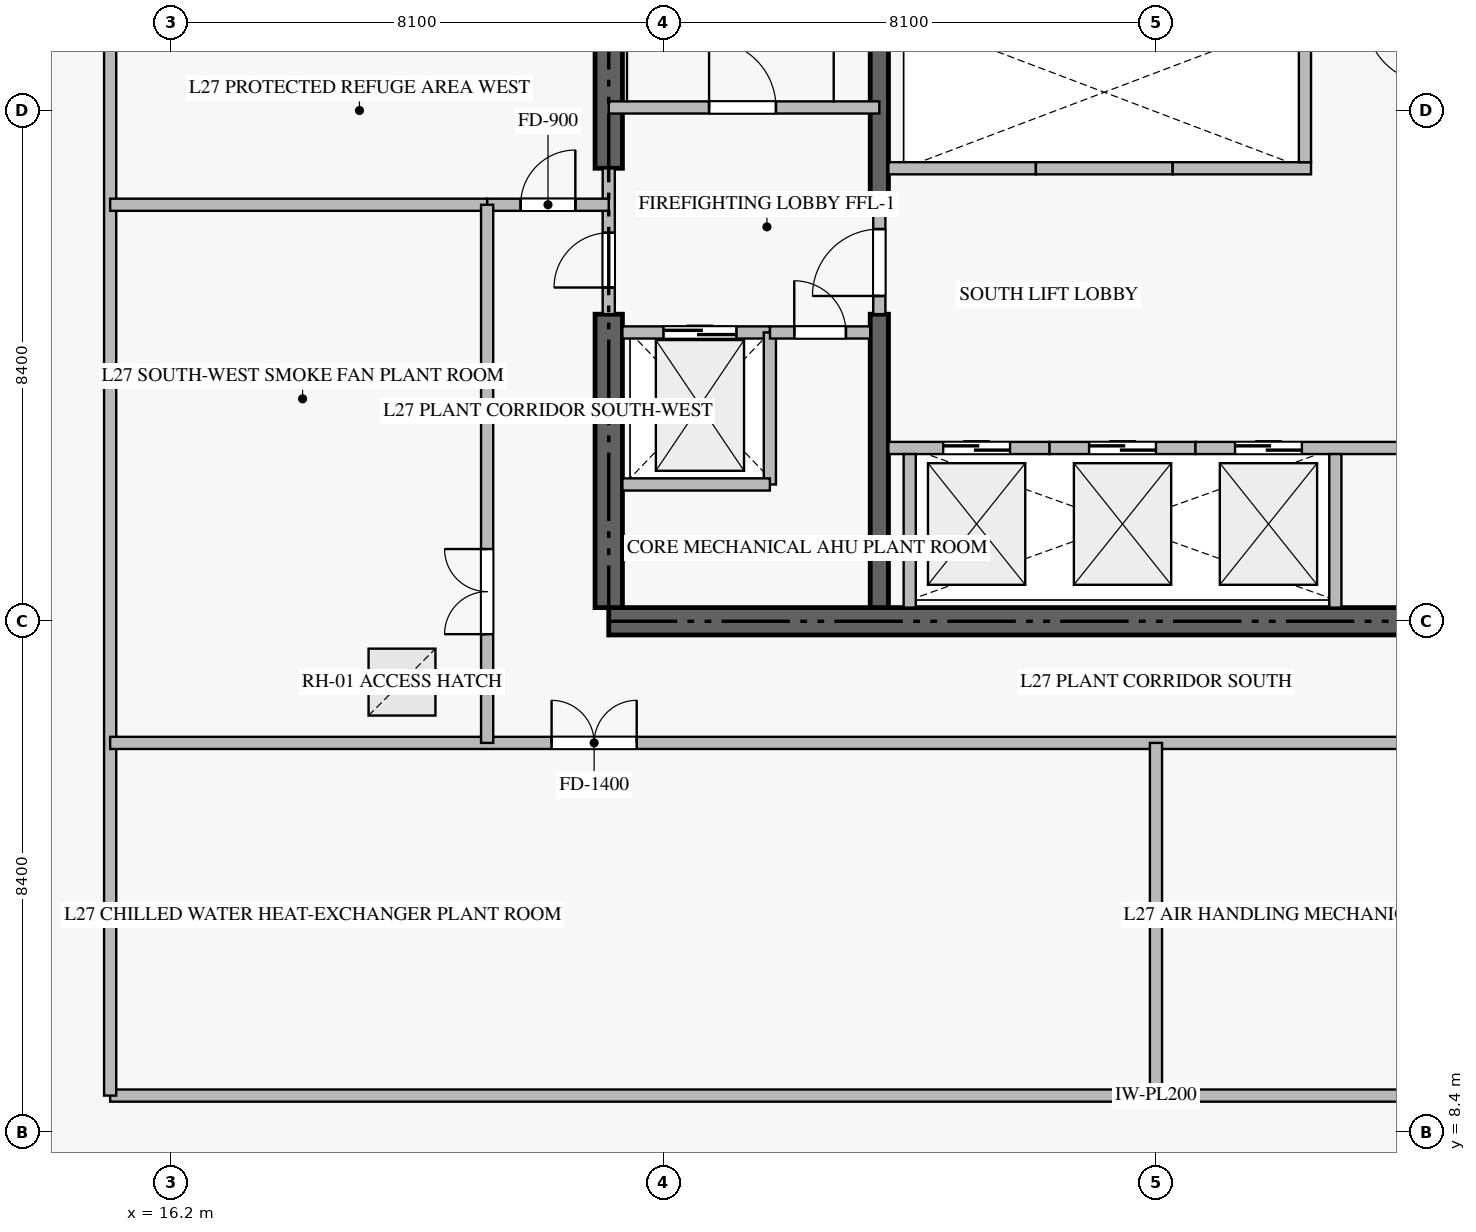
"""IFC4 building model, lengths in metres.
Left out: names, types, materials, properties, quantities, classifications, styles, units other than length and angle.
Written with IfcOpenShell. Run it as: python <this file> out.ifc"""

import sys

from ifc_helpers import new_model, si_unit, direction, frame, frame_2d, origin, origin_2d, place, context, subcontext, project, spatial, rectangle, extrude, source, transform, mapped, element, fill, save


model = new_model("IFC4")
c1 = context("Model", 3, precision=1e-05, world=origin(), true_north=direction((0.0, 1.0)))
c2 = subcontext(c1, "Body", "Model", "MODEL_VIEW")
j1 = project(units=[si_unit("LENGTHUNIT", "METRE"), si_unit("PLANEANGLEUNIT", "RADIAN")], contexts=[c1])
p1 = place(None, origin())
s1 = spatial("IfcSite", under=j1, at=p1, CompositionType="ELEMENT")
p2 = place(p1, origin())
s2 = spatial("IfcBuilding", under=s1, at=p2, CompositionType="ELEMENT")
p3 = place(p2, frame((0.0, 0.0, 109.2)))
s3 = spatial("IfcBuildingStorey", under=s2, at=p3, CompositionType="ELEMENT", Elevation=109.2)
p4 = place(p3, frame((23.4, 16.8, -0.36), z_axis=(0.0, 0.0, 1.0), x_axis=(1.0, 0.0, 0.0)))
e1 = element("IfcWall", 1, at=p4, inside=s3, PredefinedType="SHEAR", context=c2, shape_type="SweptSolid", body=[
    extrude(rectangle(XDim=18.0, YDim=0.45, at=frame_2d((9.0, 0.0))), origin(), (0.0, 0.0, 1.0), 5.998),
])
p5 = place(p3, frame((23.4, 17.025, -0.36), z_axis=(0.0, 0.0, 1.0), x_axis=(0.0, 1.0, 0.0)))
e2 = element("IfcWall", 2, at=p5, inside=s3, PredefinedType="SHEAR", context=c2, shape_type="SweptSolid", body=[
    extrude(rectangle(XDim=4.825, YDim=0.45, at=frame_2d((2.413, 0.0))), origin(), (0.0, 0.0, 1.0), 5.998),
])
p6 = place(p3, frame((23.4, 24.25, -0.36), z_axis=(0.0, 0.0, 1.0), x_axis=(0.0, 1.0, 0.0)))
e3 = element("IfcWall", 3, at=p6, inside=s3, PredefinedType="SHEAR", context=c2, shape_type="SweptSolid", body=[
    extrude(rectangle(XDim=9.125, YDim=0.45, at=frame_2d((4.562, 0.0))), origin(), (0.0, 0.0, 1.0), 5.998),
])
p7 = place(p3, frame((27.85, 17.025, -0.36), z_axis=(0.0, 0.0, 1.0), x_axis=(0.0, 1.0, 0.0)))
e4 = element("IfcWall", 4, at=p7, inside=s3, PredefinedType="SHEAR", context=c2, shape_type="SweptSolid", body=[
    extrude(rectangle(XDim=4.825, YDim=0.3, at=frame_2d((2.413, 0.0))), origin(), (0.0, 0.0, 1.0), 5.998),
])
p8 = place(p3, frame((27.85, 23.55, -0.36), z_axis=(0.0, 0.0, 1.0), x_axis=(0.0, 1.0, 0.0)))
e5 = element("IfcWall", 5, at=p8, inside=s3, PredefinedType="SHEAR", context=c2, shape_type="SweptSolid", body=[
    extrude(rectangle(XDim=9.825, YDim=0.3, at=frame_2d((4.913, 0.0))), origin(), (0.0, 0.0, 1.0), 5.998),
])
p9 = place(p3, frame((23.4, 25.25, 0.0), z_axis=(0.0, 0.0, 1.0), x_axis=(1.0, 0.0, 0.0)))
e6 = element("IfcWall", 6, at=p9, inside=s3, PredefinedType="STANDARD", context=c2, shape_type="SweptSolid", body=[
    extrude(rectangle(XDim=4.45, YDim=0.2, at=frame_2d((2.225, 0.0))), origin(), (0.0, 0.0, 1.0), 5.64),
])
p10 = place(p9, frame((1.65, 0.0, 0.0)))
e7 = element("IfcOpeningElement", 7, at=p10, cuts=e6, PredefinedType="OPENING", context=c2, shape_type="SweptSolid", body=[
    extrude(rectangle(XDim=1.1, YDim=2.15, at=frame_2d((0.55, 1.075))), frame((0.0, 0.11, 0.0), z_axis=(0.0, -1.0, 0.0), x_axis=(1.0, 0.0, 0.0)), (0.0, 0.0, 1.0), 0.22),
])
p11 = place(p3, frame((23.625, 21.55, 0.0), z_axis=(0.0, 0.0, 1.0), x_axis=(1.0, 0.0, 0.0)))
e8 = element("IfcWall", 8, at=p11, inside=s3, PredefinedType="STANDARD", context=c2, shape_type="SweptSolid", body=[
    extrude(rectangle(XDim=2.425, YDim=0.2, at=frame_2d((1.212, 0.0))), origin(), (0.0, 0.0, 1.0), 5.64),
])
p12 = place(p11, frame((0.675, 0.0, 0.0)))
e9 = element("IfcOpeningElement", 9, at=p12, cuts=e8, PredefinedType="OPENING", context=c2, shape_type="SweptSolid", body=[
    extrude(rectangle(XDim=1.2, YDim=2.2, at=frame_2d((0.6, 1.1))), frame((0.0, 0.11, 0.0), z_axis=(0.0, -1.0, 0.0), x_axis=(1.0, 0.0, 0.0)), (0.0, 0.0, 1.0), 0.22),
])
p13 = place(p3, frame((28.0, 19.65, 0.0), z_axis=(0.0, 0.0, 1.0), x_axis=(1.0, 0.0, 0.0)))
e10 = element("IfcWall", 10, at=p13, inside=s3, PredefinedType="STANDARD", context=c2, shape_type="SweptSolid", body=[
    extrude(rectangle(XDim=2.65, YDim=0.2, at=frame_2d((1.325, 0.0))), origin(), (0.0, 0.0, 1.0), 5.64),
])
p14 = place(p13, frame((0.9, 0.0, 0.0)))
e11 = element("IfcOpeningElement", 11, at=p14, cuts=e10, PredefinedType="OPENING", context=c2, shape_type="SweptSolid", body=[
    extrude(rectangle(XDim=1.1, YDim=2.2, at=frame_2d((0.55, 1.1))), frame((0.0, 0.11, 0.0), z_axis=(0.0, -1.0, 0.0), x_axis=(1.0, 0.0, 0.0)), (0.0, 0.0, 1.0), 0.22),
])
p15 = place(p3, frame((28.35, 17.025, 0.0), z_axis=(0.0, 0.0, 1.0), x_axis=(0.0, 1.0, 0.0)))
e12 = element("IfcWall", 12, at=p15, inside=s3, PredefinedType="STANDARD", context=c2, shape_type="SweptSolid", body=[
    extrude(rectangle(XDim=2.525, YDim=0.2, at=frame_2d((1.263, 0.0))), origin(), (0.0, 0.0, 1.0), 5.64),
])
p16 = place(p3, frame((30.65, 19.65, 0.0), z_axis=(0.0, 0.0, 1.0), x_axis=(1.0, 0.0, 0.0)))
e13 = element("IfcWall", 13, at=p16, inside=s3, PredefinedType="STANDARD", context=c2, shape_type="SweptSolid", body=[
    extrude(rectangle(XDim=2.4, YDim=0.2, at=frame_2d((1.2, 0.0))), origin(), (0.0, 0.0, 1.0), 5.64),
])
p17 = place(p16, frame((0.65, 0.0, 0.0)))
e14 = element("IfcOpeningElement", 14, at=p17, cuts=e13, PredefinedType="OPENING", context=c2, shape_type="SweptSolid", body=[
    extrude(rectangle(XDim=1.1, YDim=2.2, at=frame_2d((0.55, 1.1))), frame((0.0, 0.11, 0.0), z_axis=(0.0, -1.0, 0.0), x_axis=(1.0, 0.0, 0.0)), (0.0, 0.0, 1.0), 0.22),
])
p18 = place(p3, frame((33.05, 19.65, 0.0), z_axis=(0.0, 0.0, 1.0), x_axis=(1.0, 0.0, 0.0)))
e15 = element("IfcWall", 15, at=p18, inside=s3, PredefinedType="STANDARD", context=c2, shape_type="SweptSolid", body=[
    extrude(rectangle(XDim=3.75, YDim=0.2, at=frame_2d((1.875, 0.0))), origin(), (0.0, 0.0, 1.0), 5.64),
])
p19 = place(p18, frame((0.65, 0.0, 0.0)))
e16 = element("IfcOpeningElement", 16, at=p19, cuts=e15, PredefinedType="OPENING", context=c2, shape_type="SweptSolid", body=[
    extrude(rectangle(XDim=1.1, YDim=2.2, at=frame_2d((0.55, 1.1))), frame((0.0, 0.11, 0.0), z_axis=(0.0, -1.0, 0.0), x_axis=(1.0, 0.0, 0.0)), (0.0, 0.0, 1.0), 0.22),
])
p20 = place(p3, frame((35.35, 17.025, 0.0), z_axis=(0.0, 0.0, 1.0), x_axis=(0.0, 1.0, 0.0)))
e17 = element("IfcWall", 17, at=p20, inside=s3, PredefinedType="STANDARD", context=c2, shape_type="SweptSolid", body=[
    extrude(rectangle(XDim=2.525, YDim=0.2, at=frame_2d((1.263, 0.0))), origin(), (0.0, 0.0, 1.0), 5.64),
])
p21 = place(p3, frame((28.0, 24.25, 0.0), z_axis=(0.0, 0.0, 1.0), x_axis=(1.0, 0.0, 0.0)))
e18 = element("IfcWall", 18, at=p21, inside=s3, PredefinedType="STANDARD", context=c2, shape_type="SweptSolid", body=[
    extrude(rectangle(XDim=2.425, YDim=0.2, at=frame_2d((1.212, 0.0))), origin(), (0.0, 0.0, 1.0), 5.64),
])
p22 = place(p3, frame((30.425, 24.25, 0.0), z_axis=(0.0, 0.0, 1.0), x_axis=(1.0, 0.0, 0.0)))
e19 = element("IfcWall", 19, at=p22, inside=s3, PredefinedType="STANDARD", context=c2, shape_type="SweptSolid", body=[
    extrude(rectangle(XDim=2.25, YDim=0.2, at=frame_2d((1.125, 0.0))), origin(), (0.0, 0.0, 1.0), 5.64),
])
p23 = place(p3, frame((32.675, 24.25, 0.0), z_axis=(0.0, 0.0, 1.0), x_axis=(1.0, 0.0, 0.0)))
e20 = element("IfcWall", 20, at=p23, inside=s3, PredefinedType="STANDARD", context=c2, shape_type="SweptSolid", body=[
    extrude(rectangle(XDim=2.275, YDim=0.2, at=frame_2d((1.137, 0.0))), origin(), (0.0, 0.0, 1.0), 5.64),
])
for number, where, z_axis, x_axis in (
    (21, (34.85, 24.35, 0.0), (0.0, 0.0, 1.0), (0.0, 1.0, 0.0)),
    (22, (26.05, 19.05, 0.0), (0.0, 0.0, 1.0), (0.0, 1.0, 0.0)),
):
    element("IfcWall", number, at=place(p3, frame(where, z_axis=z_axis, x_axis=x_axis)), inside=s3, PredefinedType="STANDARD", context=c2, shape_type="SweptSolid", body=[
        extrude(rectangle(XDim=2.5, YDim=0.2, at=frame_2d((1.25, 0.0))), origin(), (0.0, 0.0, 1.0), 5.64),
    ])
p24 = place(p3, frame((23.625, 19.05, 0.0), z_axis=(0.0, 0.0, 1.0), x_axis=(1.0, 0.0, 0.0)))
e23 = element("IfcWall", 23, at=p24, inside=s3, PredefinedType="STANDARD", context=c2, shape_type="SweptSolid", body=[
    extrude(rectangle(XDim=2.425, YDim=0.2, at=frame_2d((1.212, 0.0))), origin(), (0.0, 0.0, 1.0), 5.64),
])
p25 = place(p3, frame((26.052, 21.55, 0.0), z_axis=(0.0, 0.0, 1.0), x_axis=(1.0, 0.0, 0.0)))
e24 = element("IfcWall", 24, at=p25, inside=s3, PredefinedType="STANDARD", context=c2, shape_type="SweptSolid", body=[
    extrude(rectangle(XDim=1.648, YDim=0.2, at=frame_2d((0.824, 0.0))), origin(), (0.0, 0.0, 1.0), 5.64),
])
p26 = place(p25, frame((0.399, 0.0, 0.0)))
e25 = element("IfcOpeningElement", 25, at=p26, cuts=e24, PredefinedType="OPENING", context=c2, shape_type="SweptSolid", body=[
    extrude(rectangle(XDim=0.85, YDim=2.1, at=frame_2d((0.425, 1.05))), frame((0.0, 0.11, 0.0), z_axis=(0.0, -1.0, 0.0), x_axis=(1.0, 0.0, 0.0)), (0.0, 0.0, 1.0), 0.22),
])
p27 = place(p3, frame((23.4, 21.852, 0.0), z_axis=(0.0, 0.0, 1.0), x_axis=(0.0, 1.0, 0.0)))
e26 = element("IfcWall", 26, at=p27, inside=s3, PredefinedType="STANDARD", context=c2, shape_type="SweptSolid", body=[
    extrude(rectangle(XDim=2.396, YDim=0.2, at=frame_2d((1.198, 0.0))), origin(), (0.0, 0.0, 1.0), 5.64),
])
p28 = place(p27, frame((0.437, 0.0, 0.0)))
e27 = element("IfcOpeningElement", 27, at=p28, cuts=e26, PredefinedType="OPENING", context=c2, shape_type="SweptSolid", body=[
    extrude(rectangle(XDim=0.9, YDim=2.1, at=frame_2d((0.45, 1.05))), frame((0.0, 0.11, 0.0), z_axis=(0.0, -1.0, 0.0), x_axis=(1.0, 0.0, 0.0)), (0.0, 0.0, 1.0), 0.22),
])
p29 = place(p3, frame((27.85, 21.852, 0.0), z_axis=(0.0, 0.0, 1.0), x_axis=(0.0, 1.0, 0.0)))
e28 = element("IfcWall", 28, at=p29, inside=s3, PredefinedType="STANDARD", context=c2, shape_type="SweptSolid", body=[
    extrude(rectangle(XDim=1.696, YDim=0.2, at=frame_2d((0.848, 0.0))), origin(), (0.0, 0.0, 1.0), 5.64),
])
p30 = place(p29, frame((0.298, 0.0, 0.0)))
e29 = element("IfcOpeningElement", 29, at=p30, cuts=e28, PredefinedType="OPENING", context=c2, shape_type="SweptSolid", body=[
    extrude(rectangle(XDim=1.1, YDim=2.15, at=frame_2d((0.55, 1.075))), frame((0.0, 0.11, 0.0), z_axis=(0.0, -1.0, 0.0), x_axis=(1.0, 0.0, 0.0)), (0.0, 0.0, 1.0), 0.22),
])
p31 = place(p3, frame((15.2, 9.0, 0.0), z_axis=(0.0, 0.0, 1.0), x_axis=(1.0, 0.0, 0.0)))
e30 = element("IfcWall", 30, at=p31, inside=s3, PredefinedType="STANDARD", context=c2, shape_type="SweptSolid", body=[
    extrude(rectangle(XDim=34.4, YDim=0.2, at=frame_2d((17.2, 0.0))), origin(), (0.0, 0.0, 1.0), 5.64),
])
p32 = place(p3, frame((15.2, 9.0, 0.0), z_axis=(0.0, 0.0, 1.0), x_axis=(0.0, 1.0, 0.0)))
e31 = element("IfcWall", 31, at=p32, inside=s3, PredefinedType="STANDARD", context=c2, shape_type="SweptSolid", body=[
    extrude(rectangle(XDim=32.4, YDim=0.2, at=frame_2d((16.2, 0.0))), origin(), (0.0, 0.0, 1.0), 5.072),
])
p33 = place(p3, frame((15.2, 23.65, 0.0), z_axis=(0.0, 0.0, 1.0), x_axis=(1.0, 0.0, 0.0)))
e32 = element("IfcWall", 32, at=p33, inside=s3, PredefinedType="STANDARD", context=c2, shape_type="SweptSolid", body=[
    extrude(rectangle(XDim=6.2, YDim=0.2, at=frame_2d((3.1, 0.0))), origin(), (0.0, 0.0, 1.0), 5.64),
])
p34 = place(p3, frame((21.402, 23.65, 0.0), z_axis=(0.0, 0.0, 1.0), x_axis=(1.0, 0.0, 0.0)))
e33 = element("IfcWall", 33, at=p34, inside=s3, PredefinedType="STANDARD", context=c2, shape_type="SweptSolid", body=[
    extrude(rectangle(XDim=1.998, YDim=0.2, at=frame_2d((0.999, 0.0))), origin(), (0.0, 0.0, 1.0), 5.64),
])
p35 = place(p34, frame((0.549, 0.0, 0.0)))
e34 = element("IfcOpeningElement", 34, at=p35, cuts=e33, PredefinedType="OPENING", context=c2, shape_type="SweptSolid", body=[
    extrude(rectangle(XDim=0.9, YDim=2.1, at=frame_2d((0.45, 1.05))), frame((0.0, 0.11, 0.0), z_axis=(0.0, -1.0, 0.0), x_axis=(1.0, 0.0, 0.0)), (0.0, 0.0, 1.0), 0.22),
])
p36 = place(p3, frame((15.2, 14.8, 0.0), z_axis=(0.0, 0.0, 1.0), x_axis=(1.0, 0.0, 0.0)))
e35 = element("IfcWall", 35, at=p36, inside=s3, PredefinedType="STANDARD", context=c2, shape_type="SweptSolid", body=[
    extrude(rectangle(XDim=34.4, YDim=0.2, at=frame_2d((17.2, 0.0))), origin(), (0.0, 0.0, 1.0), 5.64),
])
p37 = place(p36, frame((7.26, 0.0, 0.0)))
e36 = element("IfcOpeningElement", 36, at=p37, cuts=e35, PredefinedType="OPENING", context=c2, shape_type="SweptSolid", body=[
    extrude(rectangle(XDim=1.4, YDim=2.2, at=frame_2d((0.7, 1.1))), frame((0.0, 0.11, 0.0), z_axis=(0.0, -1.0, 0.0), x_axis=(1.0, 0.0, 0.0)), (0.0, 0.0, 1.0), 0.22),
])
p38 = place(p36, frame((25.74, 0.0, 0.0)))
e37 = element("IfcOpeningElement", 37, at=p38, cuts=e35, PredefinedType="OPENING", context=c2, shape_type="SweptSolid", body=[
    extrude(rectangle(XDim=1.4, YDim=2.2, at=frame_2d((0.7, 1.1))), frame((0.0, 0.11, 0.0), z_axis=(0.0, -1.0, 0.0), x_axis=(1.0, 0.0, 0.0)), (0.0, 0.0, 1.0), 0.22),
])
p39 = place(p3, frame((32.4, 9.0, 0.0), z_axis=(0.0, 0.0, 1.0), x_axis=(0.0, 1.0, 0.0)))
e38 = element("IfcWall", 38, at=p39, inside=s3, PredefinedType="STANDARD", context=c2, shape_type="SweptSolid", body=[
    extrude(rectangle(XDim=5.8, YDim=0.2, at=frame_2d((2.9, 0.0))), origin(), (0.0, 0.0, 1.0), 5.64),
])
p40 = place(p3, frame((21.4, 14.8, 0.0), z_axis=(0.0, 0.0, 1.0), x_axis=(0.0, 1.0, 0.0)))
e39 = element("IfcWall", 39, at=p40, inside=s3, PredefinedType="STANDARD", context=c2, shape_type="SweptSolid", body=[
    extrude(rectangle(XDim=8.85, YDim=0.2, at=frame_2d((4.425, 0.0))), origin(), (0.0, 0.0, 1.0), 5.64),
])
p41 = place(p40, frame((1.788, 0.0, 0.0)))
e40 = element("IfcOpeningElement", 40, at=p41, cuts=e39, PredefinedType="OPENING", context=c2, shape_type="SweptSolid", body=[
    extrude(rectangle(XDim=1.4, YDim=2.2, at=frame_2d((0.7, 1.1))), frame((0.0, 0.11, 0.0), z_axis=(0.0, -1.0, 0.0), x_axis=(1.0, 0.0, 0.0)), (0.0, 0.0, 1.0), 0.22),
])
p42 = place(p2, frame((0.0, 0.0, 115.2)))
p43 = place(p42, frame((0.0, 0.0, -0.36)))
p44 = place(p43, frame((20.0, 15.8, 0.0)))
p45 = place(p44, frame((0.0, 0.0, 0.32)))
e41 = element("IfcDoor", 41, at=p45, inside=s3, OperationType="SINGLE_SWING_LEFT", PredefinedType="TRAPDOOR", context=c2, shape_type="SweptSolid", body=[
    extrude(rectangle(XDim=1.1, YDim=1.1, at=origin_2d()), origin(), (0.0, 0.0, 1.0), 0.04),
])
m1 = source(origin(), c2, "Body", "SweptSolid", [
    extrude(rectangle(XDim=1.1, YDim=2.15, at=frame_2d((0.55, 1.075))), frame((0.0, 0.025, 0.0), z_axis=(0.0, -1.0, 0.0), x_axis=(1.0, 0.0, 0.0)), (0.0, 0.0, 1.0), 0.05),
])
p46 = place(p10, origin())
e42 = element("IfcDoor", 42, at=p46, inside=s3, OperationType="SINGLE_SWING_LEFT", PredefinedType="DOOR", context=c2, shape_type="MappedRepresentation", body=[
    mapped(m1, transform((0.0, 0.0, 0.0), scale=1.0)),
])
fill(e7, e42)
m2 = source(origin(), c2, "Body", "SweptSolid", [
    extrude(rectangle(XDim=1.2, YDim=2.2, at=frame_2d((0.6, 1.1))), frame((0.0, 0.025, 0.0), z_axis=(0.0, -1.0, 0.0), x_axis=(1.0, 0.0, 0.0)), (0.0, 0.0, 1.0), 0.05),
])
p47 = place(p12, origin())
e43 = element("IfcDoor", 43, at=p47, inside=s3, OperationType="DOUBLE_DOOR_SLIDING", PredefinedType="DOOR", context=c2, shape_type="MappedRepresentation", body=[
    mapped(m2, transform((0.0, 0.0, 0.0), scale=1.0)),
])
fill(e9, e43)
m3 = source(origin(), c2, "Body", "SweptSolid", [
    extrude(rectangle(XDim=1.1, YDim=2.2, at=frame_2d((0.55, 1.1))), frame((0.0, 0.025, 0.0), z_axis=(0.0, -1.0, 0.0), x_axis=(1.0, 0.0, 0.0)), (0.0, 0.0, 1.0), 0.05),
])
p48 = place(p14, origin())
e44 = element("IfcDoor", 44, at=p48, inside=s3, OperationType="DOUBLE_DOOR_SLIDING", PredefinedType="DOOR", context=c2, shape_type="MappedRepresentation", body=[
    mapped(m3, transform((0.0, 0.0, 0.0), scale=1.0)),
])
fill(e11, e44)
p49 = place(p17, origin())
e45 = element("IfcDoor", 45, at=p49, inside=s3, OperationType="DOUBLE_DOOR_SLIDING", PredefinedType="DOOR", context=c2, shape_type="MappedRepresentation", body=[
    mapped(m3, transform((0.0, 0.0, 0.0), scale=1.0)),
])
fill(e14, e45)
p50 = place(p19, origin())
e46 = element("IfcDoor", 46, at=p50, inside=s3, OperationType="DOUBLE_DOOR_SLIDING", PredefinedType="DOOR", context=c2, shape_type="MappedRepresentation", body=[
    mapped(m3, transform((0.0, 0.0, 0.0), scale=1.0)),
])
fill(e16, e46)
m4 = source(origin(), c2, "Body", "SweptSolid", [
    extrude(rectangle(XDim=0.85, YDim=2.1, at=frame_2d((0.425, 1.05))), frame((0.0, 0.025, 0.0), z_axis=(0.0, -1.0, 0.0), x_axis=(1.0, 0.0, 0.0)), (0.0, 0.0, 1.0), 0.05),
])
p51 = place(p26, origin())
e47 = element("IfcDoor", 47, at=p51, inside=s3, OperationType="SINGLE_SWING_LEFT", PredefinedType="DOOR", context=c2, shape_type="MappedRepresentation", body=[
    mapped(m4, transform((0.0, 0.0, 0.0), scale=1.0)),
])
fill(e25, e47)
m5 = source(origin(), c2, "Body", "SweptSolid", [
    extrude(rectangle(XDim=0.9, YDim=2.1, at=frame_2d((0.45, 1.05))), frame((0.0, 0.025, 0.0), z_axis=(0.0, -1.0, 0.0), x_axis=(1.0, 0.0, 0.0)), (0.0, 0.0, 1.0), 0.05),
])
p52 = place(p28, origin())
e48 = element("IfcDoor", 48, at=p52, inside=s3, OperationType="SINGLE_SWING_LEFT", PredefinedType="DOOR", context=c2, shape_type="MappedRepresentation", body=[
    mapped(m5, transform((0.0, 0.0, 0.0), scale=1.0)),
])
fill(e27, e48)
p53 = place(p30, origin())
e49 = element("IfcDoor", 49, at=p53, inside=s3, OperationType="SINGLE_SWING_LEFT", PredefinedType="DOOR", context=c2, shape_type="MappedRepresentation", body=[
    mapped(m1, transform((0.0, 0.0, 0.0), scale=1.0)),
])
fill(e29, e49)
p54 = place(p35, origin())
e50 = element("IfcDoor", 50, at=p54, inside=s3, OperationType="SINGLE_SWING_RIGHT", PredefinedType="DOOR", context=c2, shape_type="MappedRepresentation", body=[
    mapped(m5, transform((0.0, 0.0, 0.0), scale=1.0)),
])
fill(e34, e50)
m6 = source(origin(), c2, "Body", "SweptSolid", [
    extrude(rectangle(XDim=1.4, YDim=2.2, at=frame_2d((0.7, 1.1))), frame((0.0, 0.025, 0.0), z_axis=(0.0, -1.0, 0.0), x_axis=(1.0, 0.0, 0.0)), (0.0, 0.0, 1.0), 0.05),
])
p55 = place(p37, origin())
e51 = element("IfcDoor", 51, at=p55, inside=s3, OperationType="DOUBLE_DOOR_SINGLE_SWING", PredefinedType="DOOR", context=c2, shape_type="MappedRepresentation", body=[
    mapped(m6, transform((0.0, 0.0, 0.0), scale=1.0)),
])
fill(e36, e51)
p56 = place(p41, origin())
e52 = element("IfcDoor", 52, at=p56, inside=s3, OperationType="DOUBLE_DOOR_SINGLE_SWING", PredefinedType="DOOR", context=c2, shape_type="MappedRepresentation", body=[
    mapped(m6, transform((0.0, 0.0, 0.0), scale=1.0)),
])
fill(e40, e52)
save(model, sys.argv[1])
